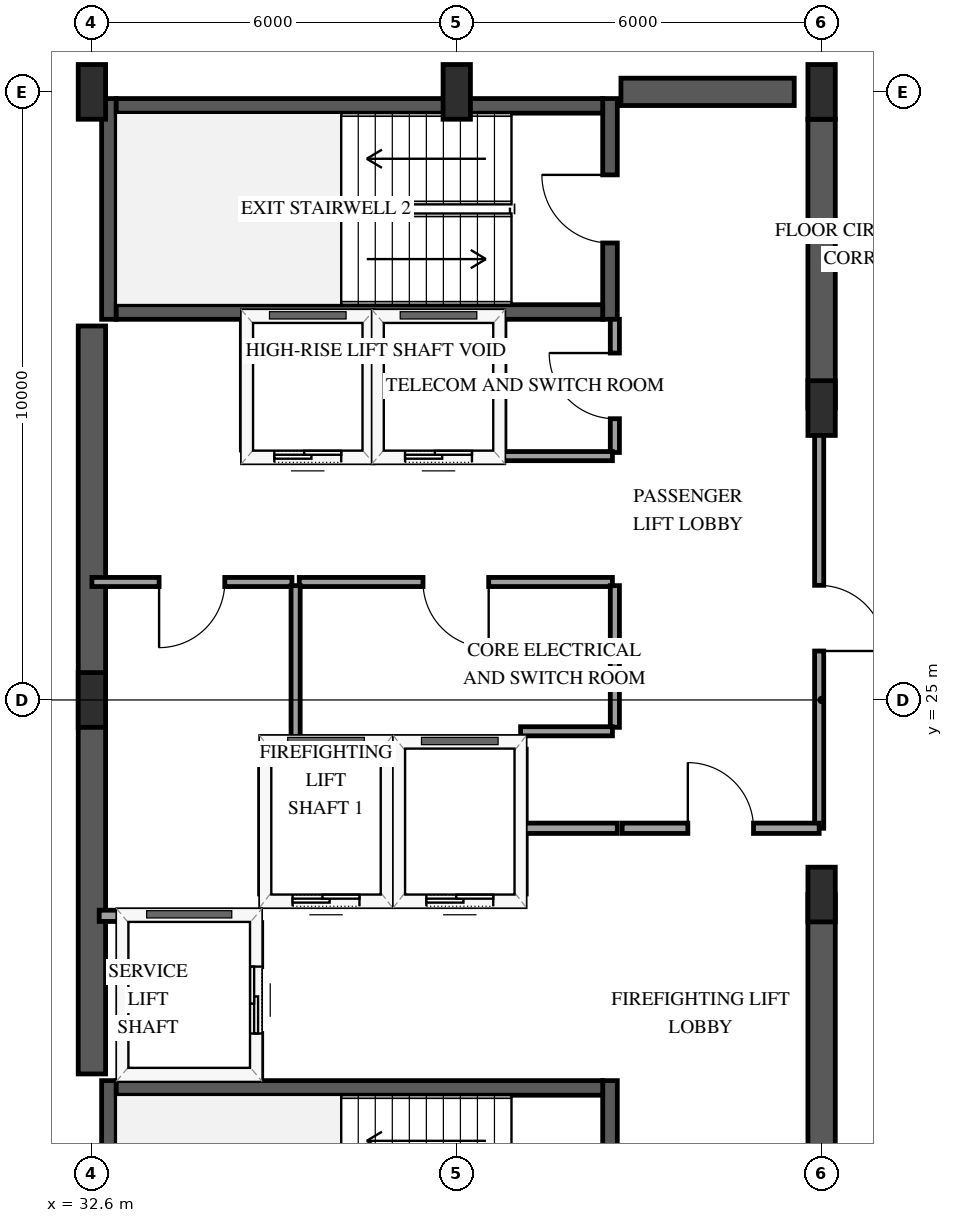
"""IFC4 building model, lengths in metres.
Left out: names, types, materials, properties, quantities, classifications, styles, units other than length and angle.
Written with IfcOpenShell. Run it as: python <this file> out.ifc"""

import sys

from ifc_helpers import new_model, si_unit, direction, frame, frame_2d, origin, origin_2d, place, context, subcontext, project, spatial, rectangle, extrude, element, fill, save


model = new_model("IFC4")
c1 = context("Model", 3, precision=1e-05, world=origin(), true_north=direction((0.0, 1.0)))
c2 = subcontext(c1, "Body", "Model", "MODEL_VIEW")
j1 = project(units=[si_unit("LENGTHUNIT", "METRE"), si_unit("PLANEANGLEUNIT", "RADIAN")], contexts=[c1])
p1 = place(None, origin())
s1 = spatial("IfcSite", under=j1, at=p1, CompositionType="ELEMENT")
p2 = place(p1, origin())
s2 = spatial("IfcBuilding", under=s1, at=p2, CompositionType="ELEMENT")
p3 = place(p2, frame((0.0, 0.0, 268.75)))
s3 = spatial("IfcBuildingStorey", under=s2, at=p3, CompositionType="ELEMENT", Elevation=268.75)
p4 = place(p3, frame((32.88, 15.11, 0.0), z_axis=(0.0, 0.0, 1.0), x_axis=(0.0, 1.0, 0.0)))
e1 = element("IfcWall", 1, at=p4, inside=s3, PredefinedType="SHEAR", context=c2, shape_type="SweptSolid", body=[
    extrude(rectangle(XDim=3.63, YDim=0.24, at=frame_2d((1.815, 0.0))), origin(), (0.0, 0.0, 1.0), 3.75),
])
p5 = place(p3, frame((41.12, 15.11, 0.0), z_axis=(0.0, 0.0, 1.0), x_axis=(0.0, 1.0, 0.0)))
e2 = element("IfcWall", 2, at=p5, inside=s3, PredefinedType="SHEAR", context=c2, shape_type="SweptSolid", body=[
    extrude(rectangle(XDim=3.63, YDim=0.24, at=frame_2d((1.815, 0.0))), origin(), (0.0, 0.0, 1.0), 3.75),
])
p6 = place(p5, frame((1.255, 0.0, 0.0)))
e3 = element("IfcOpeningElement", 3, at=p6, cuts=e2, PredefinedType="OPENING", context=c2, shape_type="SweptSolid", body=[
    extrude(rectangle(XDim=1.12, YDim=2.15, at=frame_2d((0.56, 1.075))), frame((0.0, 0.13, 0.0), z_axis=(0.0, -1.0, 0.0), x_axis=(1.0, 0.0, 0.0)), (0.0, 0.0, 1.0), 0.26),
])
p7 = place(p3, frame((33.0, 18.62, 0.0), z_axis=(0.0, 0.0, 1.0), x_axis=(1.0, 0.0, 0.0)))
e4 = element("IfcWall", 4, at=p7, inside=s3, PredefinedType="SHEAR", context=c2, shape_type="SweptSolid", body=[
    extrude(rectangle(XDim=8.0, YDim=0.24, at=frame_2d((4.0, 0.0))), origin(), (0.0, 0.0, 1.0), 3.75),
])
p8 = place(p3, frame((32.88, 31.26, 0.0), z_axis=(0.0, 0.0, 1.0), x_axis=(0.0, 1.0, 0.0)))
e5 = element("IfcWall", 5, at=p8, inside=s3, PredefinedType="SHEAR", context=c2, shape_type="SweptSolid", body=[
    extrude(rectangle(XDim=3.63, YDim=0.24, at=frame_2d((1.815, 0.0))), origin(), (0.0, 0.0, 1.0), 3.75),
])
p9 = place(p3, frame((41.12, 31.26, 0.0), z_axis=(0.0, 0.0, 1.0), x_axis=(0.0, 1.0, 0.0)))
e6 = element("IfcWall", 6, at=p9, inside=s3, PredefinedType="SHEAR", context=c2, shape_type="SweptSolid", body=[
    extrude(rectangle(XDim=3.63, YDim=0.24, at=frame_2d((1.815, 0.0))), origin(), (0.0, 0.0, 1.0), 3.75),
])
p10 = place(p9, frame((1.255, 0.0, 0.0)))
e7 = element("IfcOpeningElement", 7, at=p10, cuts=e6, PredefinedType="OPENING", context=c2, shape_type="SweptSolid", body=[
    extrude(rectangle(XDim=1.12, YDim=2.15, at=frame_2d((0.56, 1.075))), frame((0.0, 0.13, 0.0), z_axis=(0.0, -1.0, 0.0), x_axis=(1.0, 0.0, 0.0)), (0.0, 0.0, 1.0), 0.26),
])
for number, where, z_axis, x_axis in (
    (8, (33.0, 31.38, 0.0), (0.0, 0.0, 1.0), (1.0, 0.0, 0.0)),
    (9, (33.0, 34.77, 0.0), (0.0, 0.0, 1.0), (1.0, 0.0, 0.0)),
):
    element("IfcWall", number, at=place(p3, frame(where, z_axis=z_axis, x_axis=x_axis)), inside=s3, PredefinedType="SHEAR", context=c2, shape_type="SweptSolid", body=[
        extrude(rectangle(XDim=8.0, YDim=0.24, at=frame_2d((4.0, 0.0))), origin(), (0.0, 0.0, 1.0), 3.75),
    ])
p11 = place(p3, frame((32.6, 18.85, 0.0), z_axis=(0.0, 0.0, 1.0), x_axis=(0.0, 1.0, 0.0)))
e10 = element("IfcWall", 10, at=p11, inside=s3, PredefinedType="SHEAR", context=c2, shape_type="SweptSolid", body=[
    extrude(rectangle(XDim=12.3, YDim=0.45, at=frame_2d((6.15, 0.0))), origin(), (0.0, 0.0, 1.0), 3.75),
])
p12 = place(p3, frame((41.3, 35.0, 0.0), z_axis=(0.0, 0.0, 1.0), x_axis=(1.0, 0.0, 0.0)))
e11 = element("IfcWall", 11, at=p12, inside=s3, PredefinedType="SHEAR", context=c2, shape_type="SweptSolid", body=[
    extrude(rectangle(XDim=2.85, YDim=0.45, at=frame_2d((1.425, 0.0))), origin(), (0.0, 0.0, 1.0), 3.75),
])
p13 = place(p3, frame((44.6, 15.45, 0.0), z_axis=(0.0, 0.0, 1.0), x_axis=(0.0, 1.0, 0.0)))
e12 = element("IfcWall", 12, at=p13, inside=s3, PredefinedType="SHEAR", context=c2, shape_type="SweptSolid", body=[
    extrude(rectangle(XDim=6.35, YDim=0.45, at=frame_2d((3.175, 0.0))), origin(), (0.0, 0.0, 1.0), 3.75),
])
p14 = place(p3, frame((44.6, 29.8, 0.0), z_axis=(0.0, 0.0, 1.0), x_axis=(0.0, 1.0, 0.0)))
e13 = element("IfcWall", 13, at=p14, inside=s3, PredefinedType="SHEAR", context=c2, shape_type="SweptSolid", body=[
    extrude(rectangle(XDim=4.75, YDim=0.45, at=frame_2d((2.375, 0.0))), origin(), (0.0, 0.0, 1.0), 3.75),
])
for number, where, z_axis, x_axis in (
    (14, (32.6, 25.0, 0.0), (0.0, 0.0, 1.0), (1.0, 0.0, 0.0)),
    (15, (32.6, 35.0, 0.0), (0.0, 0.0, 1.0), (1.0, 0.0, 0.0)),
    (16, (38.6, 35.0, 0.0), (0.0, 0.0, 1.0), (1.0, 0.0, 0.0)),
    (17, (44.6, 21.8, 0.0), (0.0, 0.0, 1.0), (1.0, 0.0, 0.0)),
    (18, (44.6, 29.8, 0.0), (0.0, 0.0, 1.0), (1.0, 0.0, 0.0)),
    (19, (44.6, 35.0, 0.0), (0.0, 0.0, 1.0), (1.0, 0.0, 0.0)),
):
    element("IfcColumn", number, at=place(p3, frame(where, z_axis=z_axis, x_axis=x_axis)), inside=s3, PredefinedType="PILASTER", context=c2, shape_type="SweptSolid", body=[
        extrude(rectangle(XDim=0.45, YDim=0.9, at=origin_2d()), origin(), (0.0, 0.0, 1.0), 3.75),
    ])
p15 = place(p3, frame((35.45, 21.7, 0.0), z_axis=(0.0, 0.0, 1.0), x_axis=(1.0, 0.0, 0.0)))
e20 = element("IfcWall", 20, at=p15, inside=s3, PredefinedType="SOLIDWALL", context=c2, shape_type="SweptSolid", body=[
    extrude(rectangle(XDim=2.0, YDim=0.185, at=frame_2d((1.0, 0.0))), origin(), (0.0, 0.0, 1.0), 3.45),
])
p16 = place(p15, frame((0.45, 0.0, 0.0)))
e21 = element("IfcOpeningElement", 21, at=p16, cuts=e20, PredefinedType="OPENING", context=c2, shape_type="SweptSolid", body=[
    extrude(rectangle(XDim=1.1, YDim=2.15, at=frame_2d((0.55, 1.075))), frame((0.0, 0.103, 0.0), z_axis=(0.0, -1.0, 0.0), x_axis=(1.0, 0.0, 0.0)), (0.0, 0.0, 1.0), 0.205),
])
p17 = place(p3, frame((35.45, 24.3, 0.0), z_axis=(0.0, 0.0, 1.0), x_axis=(1.0, 0.0, 0.0)))
e22 = element("IfcWall", 22, at=p17, inside=s3, PredefinedType="SOLIDWALL", context=c2, shape_type="SweptSolid", body=[
    extrude(rectangle(XDim=2.0, YDim=0.185, at=frame_2d((1.0, 0.0))), origin(), (0.0, 0.0, 1.0), 3.45),
])
for number, where, z_axis, x_axis in (
    (23, (35.45, 21.81, 0.0), (0.0, 0.0, 1.0), (0.0, 1.0, 0.0)),
    (24, (37.45, 21.81, 0.0), (0.0, 0.0, 1.0), (0.0, 1.0, 0.0)),
):
    element("IfcWall", number, at=place(p3, frame(where, z_axis=z_axis, x_axis=x_axis)), inside=s3, PredefinedType="SOLIDWALL", context=c2, shape_type="SweptSolid", body=[
        extrude(rectangle(XDim=2.38, YDim=0.185, at=frame_2d((1.19, 0.0))), origin(), (0.0, 0.0, 1.0), 3.45),
    ])
p18 = place(p3, frame((37.65, 21.7, 0.0), z_axis=(0.0, 0.0, 1.0), x_axis=(1.0, 0.0, 0.0)))
e25 = element("IfcWall", 25, at=p18, inside=s3, PredefinedType="SOLIDWALL", context=c2, shape_type="SweptSolid", body=[
    extrude(rectangle(XDim=2.0, YDim=0.185, at=frame_2d((1.0, 0.0))), origin(), (0.0, 0.0, 1.0), 3.45),
])
p19 = place(p18, frame((0.45, 0.0, 0.0)))
e26 = element("IfcOpeningElement", 26, at=p19, cuts=e25, PredefinedType="OPENING", context=c2, shape_type="SweptSolid", body=[
    extrude(rectangle(XDim=1.1, YDim=2.15, at=frame_2d((0.55, 1.075))), frame((0.0, 0.103, 0.0), z_axis=(0.0, -1.0, 0.0), x_axis=(1.0, 0.0, 0.0)), (0.0, 0.0, 1.0), 0.205),
])
p20 = place(p3, frame((37.65, 24.3, 0.0), z_axis=(0.0, 0.0, 1.0), x_axis=(1.0, 0.0, 0.0)))
e27 = element("IfcWall", 27, at=p20, inside=s3, PredefinedType="SOLIDWALL", context=c2, shape_type="SweptSolid", body=[
    extrude(rectangle(XDim=2.0, YDim=0.185, at=frame_2d((1.0, 0.0))), origin(), (0.0, 0.0, 1.0), 3.45),
])
p21 = place(p3, frame((39.65, 21.81, 0.0), z_axis=(0.0, 0.0, 1.0), x_axis=(0.0, 1.0, 0.0)))
e28 = element("IfcWall", 28, at=p21, inside=s3, PredefinedType="SOLIDWALL", context=c2, shape_type="SweptSolid", body=[
    extrude(rectangle(XDim=2.38, YDim=0.185, at=frame_2d((1.19, 0.0))), origin(), (0.0, 0.0, 1.0), 3.45),
])
p22 = place(p3, frame((32.72, 21.45, 0.0), z_axis=(0.0, 0.0, 1.0), x_axis=(1.0, 0.0, 0.0)))
e29 = element("IfcWall", 29, at=p22, inside=s3, PredefinedType="SOLIDWALL", context=c2, shape_type="SweptSolid", body=[
    extrude(rectangle(XDim=2.58, YDim=0.185, at=frame_2d((1.29, 0.0))), origin(), (0.0, 0.0, 1.0), 3.45),
])
p23 = place(p3, frame((35.3, 18.79, 0.0), z_axis=(0.0, 0.0, 1.0), x_axis=(0.0, 1.0, 0.0)))
e30 = element("IfcWall", 30, at=p23, inside=s3, PredefinedType="SOLIDWALL", context=c2, shape_type="SweptSolid", body=[
    extrude(rectangle(XDim=2.55, YDim=0.185, at=frame_2d((1.275, 0.0))), origin(), (0.0, 0.0, 1.0), 3.45),
])
p24 = place(p23, frame((0.725, 0.0, 0.0)))
e31 = element("IfcOpeningElement", 31, at=p24, cuts=e30, PredefinedType="OPENING", context=c2, shape_type="SweptSolid", body=[
    extrude(rectangle(XDim=1.1, YDim=2.15, at=frame_2d((0.55, 1.075))), frame((0.0, 0.103, 0.0), z_axis=(0.0, -1.0, 0.0), x_axis=(1.0, 0.0, 0.0)), (0.0, 0.0, 1.0), 0.205),
])
p25 = place(p3, frame((35.15, 29.0, 0.0), z_axis=(0.0, 0.0, 1.0), x_axis=(1.0, 0.0, 0.0)))
e32 = element("IfcWall", 32, at=p25, inside=s3, PredefinedType="SOLIDWALL", context=c2, shape_type="SweptSolid", body=[
    extrude(rectangle(XDim=2.0, YDim=0.185, at=frame_2d((1.0, 0.0))), origin(), (0.0, 0.0, 1.0), 3.45),
])
p26 = place(p25, frame((0.45, 0.0, 0.0)))
e33 = element("IfcOpeningElement", 33, at=p26, cuts=e32, PredefinedType="OPENING", context=c2, shape_type="SweptSolid", body=[
    extrude(rectangle(XDim=1.1, YDim=2.15, at=frame_2d((0.55, 1.075))), frame((0.0, 0.103, 0.0), z_axis=(0.0, -1.0, 0.0), x_axis=(1.0, 0.0, 0.0)), (0.0, 0.0, 1.0), 0.205),
])
for number, where, z_axis, x_axis in (
    (34, (35.15, 29.11, 0.0), (0.0, 0.0, 1.0), (0.0, 1.0, 0.0)),
    (35, (37.15, 29.11, 0.0), (0.0, 0.0, 1.0), (0.0, 1.0, 0.0)),
):
    element("IfcWall", number, at=place(p3, frame(where, z_axis=z_axis, x_axis=x_axis)), inside=s3, PredefinedType="SOLIDWALL", context=c2, shape_type="SweptSolid", body=[
        extrude(rectangle(XDim=2.1, YDim=0.185, at=frame_2d((1.05, 0.0))), origin(), (0.0, 0.0, 1.0), 3.45),
    ])
p27 = place(p3, frame((37.3, 29.0, 0.0), z_axis=(0.0, 0.0, 1.0), x_axis=(1.0, 0.0, 0.0)))
e36 = element("IfcWall", 36, at=p27, inside=s3, PredefinedType="SOLIDWALL", context=c2, shape_type="SweptSolid", body=[
    extrude(rectangle(XDim=2.0, YDim=0.185, at=frame_2d((1.0, 0.0))), origin(), (0.0, 0.0, 1.0), 3.45),
])
p28 = place(p27, frame((0.45, 0.0, 0.0)))
e37 = element("IfcOpeningElement", 37, at=p28, cuts=e36, PredefinedType="OPENING", context=c2, shape_type="SweptSolid", body=[
    extrude(rectangle(XDim=1.1, YDim=2.15, at=frame_2d((0.55, 1.075))), frame((0.0, 0.103, 0.0), z_axis=(0.0, -1.0, 0.0), x_axis=(1.0, 0.0, 0.0)), (0.0, 0.0, 1.0), 0.205),
])
p29 = place(p3, frame((39.3, 29.11, 0.0), z_axis=(0.0, 0.0, 1.0), x_axis=(0.0, 1.0, 0.0)))
e38 = element("IfcWall", 38, at=p29, inside=s3, PredefinedType="SOLIDWALL", context=c2, shape_type="SweptSolid", body=[
    extrude(rectangle(XDim=2.1, YDim=0.185, at=frame_2d((1.05, 0.0))), origin(), (0.0, 0.0, 1.0), 3.45),
])
p30 = place(p3, frame((44.56, 29.8, 0.0), z_axis=(0.0, 0.0, 1.0), x_axis=(0.0, -1.0, 0.0)))
e39 = element("IfcWall", 39, at=p30, inside=s3, PredefinedType="PARTITIONING", context=c2, shape_type="SweptSolid", body=[
    extrude(rectangle(XDim=6.91, YDim=0.15, at=frame_2d((3.455, 0.0))), origin(), (0.0, 0.0, 1.0), 2.49),
])
p31 = place(p30, frame((2.915, 0.0, 0.0)))
e40 = element("IfcOpeningElement", 40, at=p31, cuts=e39, PredefinedType="OPENING", context=c2, shape_type="SweptSolid", body=[
    extrude(rectangle(XDim=1.08, YDim=2.15, at=frame_2d((0.54, 1.075))), frame((0.0, 0.085, 0.0), z_axis=(0.0, -1.0, 0.0), x_axis=(1.0, 0.0, 0.0)), (0.0, 0.0, 1.0), 0.17),
])
p32 = place(p3, frame((41.16, 26.94, 0.0), z_axis=(0.0, 0.0, 1.0), x_axis=(-1.0, 0.0, 0.0)))
e41 = element("IfcWall", 41, at=p32, inside=s3, PredefinedType="PARTITIONING", context=c2, shape_type="SweptSolid", body=[
    extrude(rectangle(XDim=5.15, YDim=0.15, at=frame_2d((2.575, 0.0))), origin(), (0.0, 0.0, 1.0), 3.45),
])
p33 = place(p32, frame((2.035, 0.0, 0.0)))
e42 = element("IfcOpeningElement", 42, at=p33, cuts=e41, PredefinedType="OPENING", context=c2, shape_type="SweptSolid", body=[
    extrude(rectangle(XDim=1.08, YDim=2.15, at=frame_2d((0.54, 1.075))), frame((0.0, 0.085, 0.0), z_axis=(0.0, -1.0, 0.0), x_axis=(1.0, 0.0, 0.0)), (0.0, 0.0, 1.0), 0.17),
])
p34 = place(p3, frame((35.89, 26.94, 0.0), z_axis=(0.0, 0.0, 1.0), x_axis=(-1.0, 0.0, 0.0)))
e43 = element("IfcWall", 43, at=p34, inside=s3, PredefinedType="PARTITIONING", context=c2, shape_type="SweptSolid", body=[
    extrude(rectangle(XDim=3.29, YDim=0.15, at=frame_2d((1.645, 0.0))), origin(), (0.0, 0.0, 1.0), 3.45),
])
p35 = place(p34, frame((1.105, 0.0, 0.0)))
e44 = element("IfcOpeningElement", 44, at=p35, cuts=e43, PredefinedType="OPENING", context=c2, shape_type="SweptSolid", body=[
    extrude(rectangle(XDim=1.08, YDim=2.15, at=frame_2d((0.54, 1.075))), frame((0.0, 0.085, 0.0), z_axis=(0.0, -1.0, 0.0), x_axis=(1.0, 0.0, 0.0)), (0.0, 0.0, 1.0), 0.17),
])
p36 = place(p3, frame((41.32, 22.89, 0.0), z_axis=(0.0, 0.0, 1.0), x_axis=(1.0, 0.0, 0.0)))
e45 = element("IfcWall", 45, at=p36, inside=s3, PredefinedType="PARTITIONING", context=c2, shape_type="SweptSolid", body=[
    extrude(rectangle(XDim=3.24, YDim=0.17, at=frame_2d((1.62, 0.0))), origin(), (0.0, 0.0, 1.0), 3.45),
])
p37 = place(p36, frame((1.08, 0.0, 0.0)))
e46 = element("IfcOpeningElement", 46, at=p37, cuts=e45, PredefinedType="OPENING", context=c2, shape_type="SweptSolid", body=[
    extrude(rectangle(XDim=1.08, YDim=2.15, at=frame_2d((0.54, 1.075))), frame((0.0, 0.095, 0.0), z_axis=(0.0, -1.0, 0.0), x_axis=(1.0, 0.0, 0.0)), (0.0, 0.0, 1.0), 0.19),
])
p38 = place(p3, frame((35.95, 26.88, 0.0), z_axis=(0.0, 0.0, 1.0), x_axis=(0.0, -1.0, 0.0)))
e47 = element("IfcWall", 47, at=p38, inside=s3, PredefinedType="PARTITIONING", context=c2, shape_type="SweptSolid", body=[
    extrude(rectangle(XDim=2.58, YDim=0.15, at=frame_2d((1.29, 0.0))), origin(), (0.0, 0.0, 1.0), 3.45),
])
p39 = place(p3, frame((41.2, 24.55, 0.0), z_axis=(0.0, 0.0, 1.0), x_axis=(0.0, 1.0, 0.0)))
e48 = element("IfcWall", 48, at=p39, inside=s3, PredefinedType="PARTITIONING", context=c2, shape_type="SweptSolid", body=[
    extrude(rectangle(XDim=2.33, YDim=0.15, at=frame_2d((1.165, 0.0))), origin(), (0.0, 0.0, 1.0), 3.45),
])
p40 = place(p3, frame((41.2, 29.07, 0.0), z_axis=(0.0, 0.0, 1.0), x_axis=(0.0, 1.0, 0.0)))
e49 = element("IfcWall", 49, at=p40, inside=s3, PredefinedType="PARTITIONING", context=c2, shape_type="SweptSolid", body=[
    extrude(rectangle(XDim=2.19, YDim=0.15, at=frame_2d((1.095, 0.0))), origin(), (0.0, 0.0, 1.0), 3.45),
])
p41 = place(p40, frame((0.555, 0.0, 0.0)))
e50 = element("IfcOpeningElement", 50, at=p41, cuts=e49, PredefinedType="OPENING", context=c2, shape_type="SweptSolid", body=[
    extrude(rectangle(XDim=1.08, YDim=2.15, at=frame_2d((0.54, 1.075))), frame((0.0, 0.085, 0.0), z_axis=(0.0, -1.0, 0.0), x_axis=(1.0, 0.0, 0.0)), (0.0, 0.0, 1.0), 0.17),
])
p42 = place(p3, frame((39.3, 29.01, 0.0), z_axis=(0.0, 0.0, 1.0), x_axis=(1.0, 0.0, 0.0)))
e51 = element("IfcWall", 51, at=p42, inside=s3, PredefinedType="PARTITIONING", context=c2, shape_type="SweptSolid", body=[
    extrude(rectangle(XDim=1.86, YDim=0.15, at=frame_2d((0.93, 0.0))), origin(), (0.0, 0.0, 1.0), 3.45),
])
p43 = place(p3, frame((39.72, 22.89, 0.0), z_axis=(0.0, 0.0, 1.0), x_axis=(1.0, 0.0, 0.0)))
e52 = element("IfcWall", 52, at=p43, inside=s3, PredefinedType="PARTITIONING", context=c2, shape_type="SweptSolid", body=[
    extrude(rectangle(XDim=1.52, YDim=0.17, at=frame_2d((0.76, 0.0))), origin(), (0.0, 0.0, 1.0), 3.45),
])
p44 = place(p3, frame((39.65, 24.485, 0.0), z_axis=(0.0, 0.0, 1.0), x_axis=(1.0, 0.0, 0.0)))
e53 = element("IfcWall", 53, at=p44, inside=s3, PredefinedType="PARTITIONING", context=c2, shape_type="SweptSolid", body=[
    extrude(rectangle(XDim=1.51, YDim=0.15, at=frame_2d((0.755, 0.0))), origin(), (0.0, 0.0, 1.0), 3.45),
])
p45 = place(p16, origin())
e54 = element("IfcDoor", 54, at=p45, inside=s3, OperationType="SLIDING_TO_LEFT", PredefinedType="DOOR", context=c2, shape_type="SweptSolid", body=[
    extrude(rectangle(XDim=1.1, YDim=2.15, at=frame_2d((0.55, 1.075))), frame((0.0, 0.025, 0.0), z_axis=(0.0, -1.0, 0.0), x_axis=(1.0, 0.0, 0.0)), (0.0, 0.0, 1.0), 0.05),
])
fill(e21, e54)
p46 = place(p19, origin())
e55 = element("IfcDoor", 55, at=p46, inside=s3, OperationType="SLIDING_TO_LEFT", PredefinedType="DOOR", context=c2, shape_type="SweptSolid", body=[
    extrude(rectangle(XDim=1.1, YDim=2.15, at=frame_2d((0.55, 1.075))), frame((0.0, 0.025, 0.0), z_axis=(0.0, -1.0, 0.0), x_axis=(1.0, 0.0, 0.0)), (0.0, 0.0, 1.0), 0.05),
])
fill(e26, e55)
p47 = place(p24, origin())
e56 = element("IfcDoor", 56, at=p47, inside=s3, OperationType="SLIDING_TO_LEFT", PredefinedType="DOOR", context=c2, shape_type="SweptSolid", body=[
    extrude(rectangle(XDim=1.1, YDim=2.15, at=frame_2d((0.55, 1.075))), frame((0.0, 0.025, 0.0), z_axis=(0.0, -1.0, 0.0), x_axis=(1.0, 0.0, 0.0)), (0.0, 0.0, 1.0), 0.05),
])
fill(e31, e56)
p48 = place(p26, origin())
e57 = element("IfcDoor", 57, at=p48, inside=s3, OperationType="SLIDING_TO_LEFT", PredefinedType="DOOR", context=c2, shape_type="SweptSolid", body=[
    extrude(rectangle(XDim=1.1, YDim=2.15, at=frame_2d((0.55, 1.075))), frame((0.0, 0.025, 0.0), z_axis=(0.0, -1.0, 0.0), x_axis=(1.0, 0.0, 0.0)), (0.0, 0.0, 1.0), 0.05),
])
fill(e33, e57)
p49 = place(p28, origin())
e58 = element("IfcDoor", 58, at=p49, inside=s3, OperationType="SLIDING_TO_LEFT", PredefinedType="DOOR", context=c2, shape_type="SweptSolid", body=[
    extrude(rectangle(XDim=1.1, YDim=2.15, at=frame_2d((0.55, 1.075))), frame((0.0, 0.025, 0.0), z_axis=(0.0, -1.0, 0.0), x_axis=(1.0, 0.0, 0.0)), (0.0, 0.0, 1.0), 0.05),
])
fill(e37, e58)
p50 = place(p10, origin())
e59 = element("IfcDoor", 59, at=p50, inside=s3, OperationType="SINGLE_SWING_RIGHT", PredefinedType="DOOR", context=c2, shape_type="SweptSolid", body=[
    extrude(rectangle(XDim=1.12, YDim=2.15, at=frame_2d((0.56, 1.075))), frame((0.0, 0.025, 0.0), z_axis=(0.0, -1.0, 0.0), x_axis=(1.0, 0.0, 0.0)), (0.0, 0.0, 1.0), 0.05),
])
fill(e7, e59)
p51 = place(p31, origin())
e60 = element("IfcDoor", 60, at=p51, inside=s3, OperationType="SINGLE_SWING_RIGHT", PredefinedType="DOOR", context=c2, shape_type="SweptSolid", body=[
    extrude(rectangle(XDim=1.08, YDim=2.15, at=frame_2d((0.54, 1.075))), frame((0.0, 0.025, 0.0), z_axis=(0.0, -1.0, 0.0), x_axis=(1.0, 0.0, 0.0)), (0.0, 0.0, 1.0), 0.05),
])
fill(e40, e60)
p52 = place(p33, origin())
e61 = element("IfcDoor", 61, at=p52, inside=s3, OperationType="SINGLE_SWING_LEFT", PredefinedType="DOOR", context=c2, shape_type="SweptSolid", body=[
    extrude(rectangle(XDim=1.08, YDim=2.15, at=frame_2d((0.54, 1.075))), frame((0.0, 0.025, 0.0), z_axis=(0.0, -1.0, 0.0), x_axis=(1.0, 0.0, 0.0)), (0.0, 0.0, 1.0), 0.05),
])
fill(e42, e61)
p53 = place(p35, origin())
e62 = element("IfcDoor", 62, at=p53, inside=s3, OperationType="SINGLE_SWING_RIGHT", PredefinedType="DOOR", context=c2, shape_type="SweptSolid", body=[
    extrude(rectangle(XDim=1.08, YDim=2.15, at=frame_2d((0.54, 1.075))), frame((0.0, 0.025, 0.0), z_axis=(0.0, -1.0, 0.0), x_axis=(1.0, 0.0, 0.0)), (0.0, 0.0, 1.0), 0.05),
])
fill(e44, e62)
p54 = place(p37, origin())
e63 = element("IfcDoor", 63, at=p54, inside=s3, OperationType="SINGLE_SWING_LEFT", PredefinedType="DOOR", context=c2, shape_type="SweptSolid", body=[
    extrude(rectangle(XDim=1.08, YDim=2.15, at=frame_2d((0.54, 1.075))), frame((0.0, 0.025, 0.0), z_axis=(0.0, -1.0, 0.0), x_axis=(1.0, 0.0, 0.0)), (0.0, 0.0, 1.0), 0.05),
])
fill(e46, e63)
p55 = place(p41, origin())
e64 = element("IfcDoor", 64, at=p55, inside=s3, OperationType="SINGLE_SWING_RIGHT", PredefinedType="DOOR", context=c2, shape_type="SweptSolid", body=[
    extrude(rectangle(XDim=1.08, YDim=2.15, at=frame_2d((0.54, 1.075))), frame((0.0, 0.025, 0.0), z_axis=(0.0, -1.0, 0.0), x_axis=(1.0, 0.0, 0.0)), (0.0, 0.0, 1.0), 0.05),
])
fill(e50, e64)
save(model, sys.argv[1])
